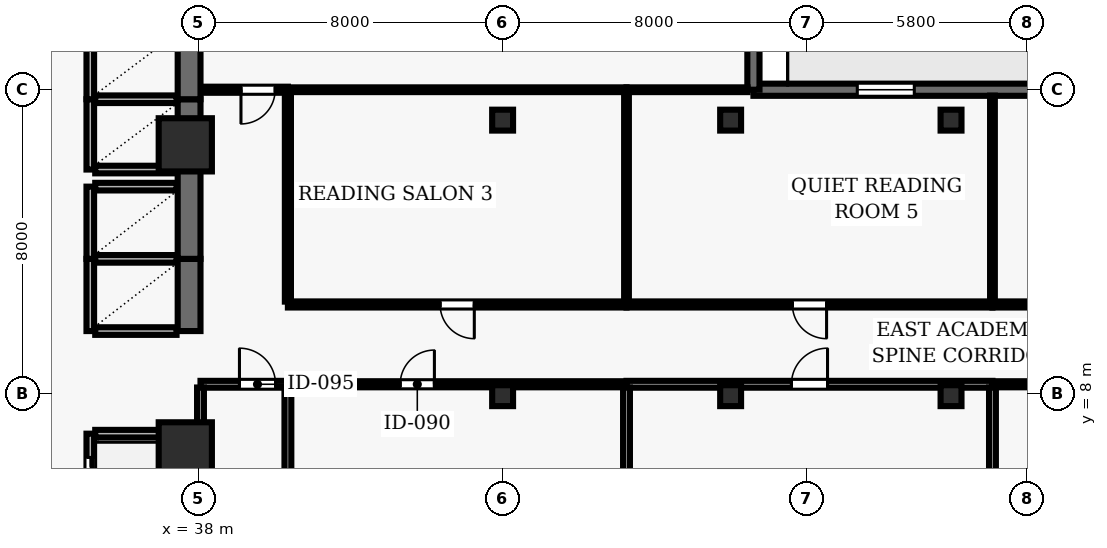
"""IFC4 building model, lengths in metres.
Left out: names, types, materials, properties, quantities, classifications, styles, units other than length and angle.
Written with IfcOpenShell. Run it as: python <this file> out.ifc"""

import sys

from ifc_helpers import new_model, si_unit, direction, frame, frame_2d, origin, origin_2d, place, context, subcontext, project, spatial, rectangle, hollow_rectangle, extrude, element, fill, save


model = new_model("IFC4")
c1 = context("Model", 3, precision=1e-05, world=origin(), true_north=direction((0.0, 1.0)))
c2 = subcontext(c1, "Body", "Model", "MODEL_VIEW")
j1 = project(units=[si_unit("LENGTHUNIT", "METRE"), si_unit("PLANEANGLEUNIT", "RADIAN")], contexts=[c1])
p1 = place(None, origin())
s1 = spatial("IfcSite", under=j1, at=p1, CompositionType="ELEMENT")
p2 = place(p1, origin())
s2 = spatial("IfcBuilding", under=s1, at=p2, CompositionType="ELEMENT")
p3 = place(p2, frame((0.0, 0.0, 58.3)))
s3 = spatial("IfcBuildingStorey", under=s2, at=p3, CompositionType="ELEMENT", Elevation=58.3)
for number, where, z_axis, x_axis in (
    (1, (37.65, 6.55, 0.0), (0.0, 0.0, 1.0), (1.0, 0.0, 0.0)),
    (2, (37.65, 14.55, 0.0), (0.0, 0.0, 1.0), (1.0, 0.0, 0.0)),
):
    element("IfcColumn", number, at=place(p3, frame(where, z_axis=z_axis, x_axis=x_axis)), inside=s3, PredefinedType="COLUMN", context=c2, shape_type="SweptSolid", body=[
        extrude(rectangle(XDim=1.4, YDim=1.4, at=origin_2d()), origin(), (0.0, 0.0, 1.0), 3.9),
    ])
for number, where, z_axis, x_axis in (
    (3, (46.0, 7.95, 0.0), (0.0, 0.0, 1.0), (1.0, 0.0, 0.0)),
    (4, (46.0, 15.2, 0.0), (0.0, 0.0, 1.0), (1.0, 0.0, 0.0)),
    (5, (52.0, 7.95, 0.0), (0.0, 0.0, 1.0), (1.0, 0.0, 0.0)),
    (6, (52.0, 15.2, 0.0), (0.0, 0.0, 1.0), (1.0, 0.0, 0.0)),
    (7, (57.8, 7.95, 0.0), (0.0, 0.0, 1.0), (1.0, 0.0, 0.0)),
    (8, (57.8, 15.2, 0.0), (0.0, 0.0, 1.0), (1.0, 0.0, 0.0)),
):
    element("IfcColumn", number, at=place(p3, frame(where, z_axis=z_axis, x_axis=x_axis)), inside=s3, PredefinedType="COLUMN", context=c2, shape_type="SweptSolid", body=[
        extrude(hollow_rectangle(XDim=0.55, YDim=0.55, WallThickness=0.025, at=origin_2d()), origin(), (0.0, 0.0, 1.0), 3.9),
    ])
p4 = place(p3, frame((73.5, 16.0, 0.0), z_axis=(0.0, 0.0, 1.0), x_axis=(-1.0, 0.0, 0.0)))
e9 = element("IfcWall", 9, at=p4, inside=s3, PredefinedType="SOLIDWALL", context=c2, shape_type="SweptSolid", body=[
    extrude(rectangle(XDim=20.9, YDim=0.32, at=frame_2d((10.45, 0.0))), origin(), (0.0, 0.0, 1.0), 3.69),
])
p5 = place(p4, frame((12.05, 0.0, 0.0)))
e10 = element("IfcOpeningElement", 10, at=p5, cuts=e9, PredefinedType="OPENING", context=c2, shape_type="SweptSolid", body=[
    extrude(rectangle(XDim=1.0, YDim=2.2, at=frame_2d((0.5, 1.1))), frame((0.0, 0.17, 0.0), z_axis=(0.0, -1.0, 0.0), x_axis=(1.0, 0.0, 0.0)), (0.0, 0.0, 1.0), 0.34),
])
p6 = place(p4, frame((2.733, 0.0, 0.9)))
e11 = element("IfcOpeningElement", 11, at=p6, cuts=e9, PredefinedType="OPENING", context=c2, shape_type="SweptSolid", body=[
    extrude(rectangle(XDim=1.5, YDim=1.8, at=frame_2d((0.75, 0.9))), frame((0.0, 0.17, 0.0), z_axis=(0.0, -1.0, 0.0), x_axis=(1.0, 0.0, 0.0)), (0.0, 0.0, 1.0), 0.34),
])
p7 = place(p4, frame((16.667, 0.0, 0.9)))
e12 = element("IfcOpeningElement", 12, at=p7, cuts=e9, PredefinedType="OPENING", context=c2, shape_type="SweptSolid", body=[
    extrude(rectangle(XDim=1.5, YDim=1.8, at=frame_2d((0.75, 0.9))), frame((0.0, 0.17, 0.0), z_axis=(0.0, -1.0, 0.0), x_axis=(1.0, 0.0, 0.0)), (0.0, 0.0, 1.0), 0.34),
])
p8 = place(p3, frame((52.6, 16.0, 0.0), z_axis=(0.0, 0.0, 1.0), x_axis=(0.0, 1.0, 0.0)))
e13 = element("IfcWall", 13, at=p8, inside=s3, PredefinedType="SOLIDWALL", context=c2, shape_type="SweptSolid", body=[
    extrude(rectangle(XDim=10.095, YDim=0.32, at=frame_2d((5.047, 0.0))), origin(), (0.0, 0.0, 1.0), 3.69),
])
p9 = place(p8, frame((4.147, 0.0, 0.9)))
e14 = element("IfcOpeningElement", 14, at=p9, cuts=e13, PredefinedType="OPENING", context=c2, shape_type="SweptSolid", body=[
    extrude(rectangle(XDim=1.8, YDim=1.8, at=frame_2d((0.9, 0.9))), frame((0.0, 0.17, 0.0), z_axis=(0.0, -1.0, 0.0), x_axis=(1.0, 0.0, 0.0)), (0.0, 0.0, 1.0), 0.34),
])
p10 = place(p3, frame((35.15, 6.95, 0.0), z_axis=(0.0, 0.0, 1.0), x_axis=(0.0, -1.0, 0.0)))
e15 = element("IfcWall", 15, at=p10, inside=s3, PredefinedType="SOLIDWALL", context=c2, shape_type="SweptSolid", body=[
    extrude(rectangle(XDim=2.25, YDim=0.2, at=frame_2d((1.125, 0.0))), origin(), (0.0, 0.0, 1.0), 3.69),
])
p11 = place(p10, frame((0.625, 0.0, 0.0)))
e16 = element("IfcOpeningElement", 16, at=p11, cuts=e15, PredefinedType="OPENING", context=c2, shape_type="SweptSolid", body=[
    extrude(rectangle(XDim=1.0, YDim=2.1, at=frame_2d((0.5, 1.05))), frame((0.0, 0.11, 0.0), z_axis=(0.0, -1.0, 0.0), x_axis=(1.0, 0.0, 0.0)), (0.0, 0.0, 1.0), 0.22),
])
p12 = place(p3, frame((37.75, 4.7, 0.0), z_axis=(0.0, 0.0, 1.0), x_axis=(0.0, 1.0, 0.0)))
e17 = element("IfcWall", 17, at=p12, inside=s3, PredefinedType="SHEAR", context=c2, shape_type="SweptSolid", body=[
    extrude(rectangle(XDim=2.25, YDim=0.6, at=frame_2d((1.125, 0.0))), origin(), (0.0, 0.0, 1.0), 3.69),
])
p13 = place(p3, frame((37.42, 6.95, 0.0), z_axis=(0.0, 0.0, 1.0), x_axis=(-1.0, 0.0, 0.0)))
e18 = element("IfcWall", 18, at=p13, inside=s3, PredefinedType="SOLIDWALL", context=c2, shape_type="SweptSolid", body=[
    extrude(rectangle(XDim=2.14, YDim=0.2, at=frame_2d((1.07, 0.0))), origin(), (0.0, 0.0, 1.0), 3.69),
])
p14 = place(p3, frame((35.15, 11.55, 0.0), z_axis=(0.0, 0.0, 1.0), x_axis=(0.0, -1.0, 0.0)))
e19 = element("IfcWall", 19, at=p14, inside=s3, PredefinedType="SOLIDWALL", context=c2, shape_type="SweptSolid", body=[
    extrude(rectangle(XDim=1.9, YDim=0.2, at=frame_2d((0.95, 0.0))), origin(), (0.0, 0.0, 1.0), 3.69),
])
p15 = place(p3, frame((37.75, 9.65, 0.0), z_axis=(0.0, 0.0, 1.0), x_axis=(0.0, 1.0, 0.0)))
e20 = element("IfcWall", 20, at=p15, inside=s3, PredefinedType="SHEAR", context=c2, shape_type="SweptSolid", body=[
    extrude(rectangle(XDim=1.9, YDim=0.6, at=frame_2d((0.95, 0.0))), origin(), (0.0, 0.0, 1.0), 3.69),
])
for number, where, z_axis, x_axis in (
    (21, (35.28, 9.65, 0.0), (0.0, 0.0, 1.0), (1.0, 0.0, 0.0)),
    (22, (37.42, 11.55, 0.0), (0.0, 0.0, 1.0), (-1.0, 0.0, 0.0)),
):
    element("IfcWall", number, at=place(p3, frame(where, z_axis=z_axis, x_axis=x_axis)), inside=s3, PredefinedType="SOLIDWALL", context=c2, shape_type="SweptSolid", body=[
        extrude(rectangle(XDim=2.14, YDim=0.2, at=frame_2d((1.07, 0.0))), origin(), (0.0, 0.0, 1.0), 3.69),
    ])
p16 = place(p3, frame((35.15, 13.45, 0.0), z_axis=(0.0, 0.0, 1.0), x_axis=(0.0, -1.0, 0.0)))
e23 = element("IfcWall", 23, at=p16, inside=s3, PredefinedType="SOLIDWALL", context=c2, shape_type="SweptSolid", body=[
    extrude(rectangle(XDim=1.9, YDim=0.2, at=frame_2d((0.95, 0.0))), origin(), (0.0, 0.0, 1.0), 3.69),
])
p17 = place(p3, frame((37.75, 11.55, 0.0), z_axis=(0.0, 0.0, 1.0), x_axis=(0.0, 1.0, 0.0)))
e24 = element("IfcWall", 24, at=p17, inside=s3, PredefinedType="SHEAR", context=c2, shape_type="SweptSolid", body=[
    extrude(rectangle(XDim=2.35, YDim=0.6, at=frame_2d((1.175, 0.0))), origin(), (0.0, 0.0, 1.0), 3.69),
])
p18 = place(p3, frame((37.42, 13.45, 0.0), z_axis=(0.0, 0.0, 1.0), x_axis=(-1.0, 0.0, 0.0)))
e25 = element("IfcWall", 25, at=p18, inside=s3, PredefinedType="SOLIDWALL", context=c2, shape_type="SweptSolid", body=[
    extrude(rectangle(XDim=2.14, YDim=0.2, at=frame_2d((1.07, 0.0))), origin(), (0.0, 0.0, 1.0), 3.69),
])
p19 = place(p3, frame((35.15, 15.75, 0.0), z_axis=(0.0, 0.0, 1.0), x_axis=(0.0, -1.0, 0.0)))
e26 = element("IfcWall", 26, at=p19, inside=s3, PredefinedType="SOLIDWALL", context=c2, shape_type="SweptSolid", body=[
    extrude(rectangle(XDim=1.85, YDim=0.2, at=frame_2d((0.925, 0.0))), origin(), (0.0, 0.0, 1.0), 3.69),
])
p20 = place(p3, frame((37.75, 13.9, 0.0), z_axis=(0.0, 0.0, 1.0), x_axis=(0.0, 1.0, 0.0)))
e27 = element("IfcWall", 27, at=p20, inside=s3, PredefinedType="SHEAR", context=c2, shape_type="SweptSolid", body=[
    extrude(rectangle(XDim=1.85, YDim=0.6, at=frame_2d((0.925, 0.0))), origin(), (0.0, 0.0, 1.0), 3.69),
])
for number, where, z_axis, x_axis in (
    (28, (35.28, 13.9, 0.0), (0.0, 0.0, 1.0), (1.0, 0.0, 0.0)),
    (29, (37.42, 15.75, 0.0), (0.0, 0.0, 1.0), (-1.0, 0.0, 0.0)),
):
    element("IfcWall", number, at=place(p3, frame(where, z_axis=z_axis, x_axis=x_axis)), inside=s3, PredefinedType="SOLIDWALL", context=c2, shape_type="SweptSolid", body=[
        extrude(rectangle(XDim=2.14, YDim=0.2, at=frame_2d((1.07, 0.0))), origin(), (0.0, 0.0, 1.0), 3.69),
    ])
p21 = place(p3, frame((35.15, 17.6, 0.0), z_axis=(0.0, 0.0, 1.0), x_axis=(0.0, -1.0, 0.0)))
e30 = element("IfcWall", 30, at=p21, inside=s3, PredefinedType="SOLIDWALL", context=c2, shape_type="SweptSolid", body=[
    extrude(rectangle(XDim=1.85, YDim=0.2, at=frame_2d((0.925, 0.0))), origin(), (0.0, 0.0, 1.0), 3.69),
])
p22 = place(p3, frame((37.75, 15.75, 0.0), z_axis=(0.0, 0.0, 1.0), x_axis=(0.0, 1.0, 0.0)))
e31 = element("IfcWall", 31, at=p22, inside=s3, PredefinedType="SHEAR", context=c2, shape_type="SweptSolid", body=[
    extrude(rectangle(XDim=1.85, YDim=0.6, at=frame_2d((0.925, 0.0))), origin(), (0.0, 0.0, 1.0), 3.69),
])
p23 = place(p3, frame((38.05, 8.25, 0.0), z_axis=(0.0, 0.0, 1.0), x_axis=(1.0, 0.0, 0.0)))
e32 = element("IfcWall", 32, at=p23, inside=s3, PredefinedType="PARTITIONING", context=c2, shape_type="SweptSolid", body=[
    extrude(rectangle(XDim=2.3, YDim=0.18, at=frame_2d((1.15, 0.0))), origin(), (0.0, 0.0, 1.0), 3.055),
])
p24 = place(p23, frame((1.025, 0.0, 0.0)))
e33 = element("IfcOpeningElement", 33, at=p24, cuts=e32, PredefinedType="OPENING", context=c2, shape_type="SweptSolid", body=[
    extrude(rectangle(XDim=0.95, YDim=2.1, at=frame_2d((0.475, 1.05))), frame((0.0, 0.1, 0.0), z_axis=(0.0, -1.0, 0.0), x_axis=(1.0, 0.0, 0.0)), (0.0, 0.0, 1.0), 0.2),
])
p25 = place(p3, frame((40.35, 8.25, 0.0), z_axis=(0.0, 0.0, 1.0), x_axis=(1.0, 0.0, 0.0)))
e34 = element("IfcWall", 34, at=p25, inside=s3, PredefinedType="PARTITIONING", context=c2, shape_type="SweptSolid", body=[
    extrude(rectangle(XDim=8.91, YDim=0.16, at=frame_2d((4.455, 0.0))), origin(), (0.0, 0.0, 1.0), 3.055),
])
p26 = place(p25, frame((2.955, 0.0, 0.0)))
e35 = element("IfcOpeningElement", 35, at=p26, cuts=e34, PredefinedType="OPENING", context=c2, shape_type="SweptSolid", body=[
    extrude(rectangle(XDim=0.9, YDim=2.1, at=frame_2d((0.45, 1.05))), frame((0.0, 0.09, 0.0), z_axis=(0.0, -1.0, 0.0), x_axis=(1.0, 0.0, 0.0)), (0.0, 0.0, 1.0), 0.18),
])
p27 = place(p3, frame((40.35, 16.0, 0.0), z_axis=(0.0, 0.0, 1.0), x_axis=(-1.0, 0.0, 0.0)))
e36 = element("IfcWall", 36, at=p27, inside=s3, PredefinedType="PARTITIONING", context=c2, shape_type="SweptSolid", body=[
    extrude(rectangle(XDim=2.27, YDim=0.16, at=frame_2d((1.135, 0.0))), origin(), (0.0, 0.0, 1.0), 3.69),
])
p28 = place(p27, frame((0.335, 0.0, 0.0)))
e37 = element("IfcOpeningElement", 37, at=p28, cuts=e36, PredefinedType="OPENING", context=c2, shape_type="SweptSolid", body=[
    extrude(rectangle(XDim=0.9, YDim=2.1, at=frame_2d((0.45, 1.05))), frame((0.0, 0.09, 0.0), z_axis=(0.0, -1.0, 0.0), x_axis=(1.0, 0.0, 0.0)), (0.0, 0.0, 1.0), 0.18),
])
p29 = place(p3, frame((49.26, 8.25, 0.0), z_axis=(0.0, 0.0, 1.0), x_axis=(1.0, 0.0, 0.0)))
e38 = element("IfcWall", 38, at=p29, inside=s3, PredefinedType="PARTITIONING", context=c2, shape_type="SweptSolid", body=[
    extrude(rectangle(XDim=9.63, YDim=0.18, at=frame_2d((4.815, 0.0))), origin(), (0.0, 0.0, 1.0), 3.055),
])
p30 = place(p29, frame((4.34, 0.0, 0.0)))
e39 = element("IfcOpeningElement", 39, at=p30, cuts=e38, PredefinedType="OPENING", context=c2, shape_type="SweptSolid", body=[
    extrude(rectangle(XDim=0.95, YDim=2.1, at=frame_2d((0.475, 1.05))), frame((0.0, 0.1, 0.0), z_axis=(0.0, -1.0, 0.0), x_axis=(1.0, 0.0, 0.0)), (0.0, 0.0, 1.0), 0.2),
])
p31 = place(p3, frame((49.26, 10.35, 0.0), z_axis=(0.0, 0.0, 1.0), x_axis=(-1.0, 0.0, 0.0)))
e40 = element("IfcWall", 40, at=p31, inside=s3, PredefinedType="PARTITIONING", context=c2, shape_type="SweptSolid", body=[
    extrude(rectangle(XDim=8.91, YDim=0.16, at=frame_2d((4.455, 0.0))), origin(), (0.0, 0.0, 1.0), 3.277),
])
p32 = place(p31, frame((4.005, 0.0, 0.0)))
e41 = element("IfcOpeningElement", 41, at=p32, cuts=e40, PredefinedType="OPENING", context=c2, shape_type="SweptSolid", body=[
    extrude(rectangle(XDim=0.9, YDim=2.1, at=frame_2d((0.45, 1.05))), frame((0.0, 0.09, 0.0), z_axis=(0.0, -1.0, 0.0), x_axis=(1.0, 0.0, 0.0)), (0.0, 0.0, 1.0), 0.18),
])
p33 = place(p3, frame((49.26, 16.0, 0.0), z_axis=(0.0, 0.0, 1.0), x_axis=(1.0, 0.0, 0.0)))
e42 = element("IfcWall", 42, at=p33, inside=s3, PredefinedType="PARTITIONING", context=c2, shape_type="SweptSolid", body=[
    extrude(rectangle(XDim=3.185, YDim=0.125, at=frame_2d((1.593, 0.0))), origin(), (0.0, 0.0, 1.0), 3.39),
])
p34 = place(p3, frame((49.26, 16.0, 0.0), z_axis=(0.0, 0.0, 1.0), x_axis=(-1.0, 0.0, 0.0)))
e43 = element("IfcWall", 43, at=p34, inside=s3, PredefinedType="PARTITIONING", context=c2, shape_type="SweptSolid", body=[
    extrude(rectangle(XDim=8.91, YDim=0.125, at=frame_2d((4.455, 0.0))), origin(), (0.0, 0.0, 1.0), 3.39),
])
p35 = place(p3, frame((58.89, 8.25, 0.0), z_axis=(0.0, 0.0, 1.0), x_axis=(1.0, 0.0, 0.0)))
e44 = element("IfcWall", 44, at=p35, inside=s3, PredefinedType="PARTITIONING", context=c2, shape_type="SweptSolid", body=[
    extrude(rectangle(XDim=9.71, YDim=0.16, at=frame_2d((4.855, 0.0))), origin(), (0.0, 0.0, 1.0), 3.69),
])
p36 = place(p35, frame((4.405, 0.0, 0.0)))
e45 = element("IfcOpeningElement", 45, at=p36, cuts=e44, PredefinedType="OPENING", context=c2, shape_type="SweptSolid", body=[
    extrude(rectangle(XDim=0.9, YDim=2.1, at=frame_2d((0.45, 1.05))), frame((0.0, 0.09, 0.0), z_axis=(0.0, -1.0, 0.0), x_axis=(1.0, 0.0, 0.0)), (0.0, 0.0, 1.0), 0.18),
])
p37 = place(p3, frame((58.89, 10.35, 0.0), z_axis=(0.0, 0.0, 1.0), x_axis=(-1.0, 0.0, 0.0)))
e46 = element("IfcWall", 46, at=p37, inside=s3, PredefinedType="PARTITIONING", context=c2, shape_type="SweptSolid", body=[
    extrude(rectangle(XDim=9.63, YDim=0.16, at=frame_2d((4.815, 0.0))), origin(), (0.0, 0.0, 1.0), 3.277),
])
p38 = place(p37, frame((4.365, 0.0, 0.0)))
e47 = element("IfcOpeningElement", 47, at=p38, cuts=e46, PredefinedType="OPENING", context=c2, shape_type="SweptSolid", body=[
    extrude(rectangle(XDim=0.9, YDim=2.1, at=frame_2d((0.45, 1.05))), frame((0.0, 0.09, 0.0), z_axis=(0.0, -1.0, 0.0), x_axis=(1.0, 0.0, 0.0)), (0.0, 0.0, 1.0), 0.18),
])
p39 = place(p3, frame((68.6, 10.35, 0.0), z_axis=(0.0, 0.0, 1.0), x_axis=(-1.0, 0.0, 0.0)))
e48 = element("IfcWall", 48, at=p39, inside=s3, PredefinedType="PARTITIONING", context=c2, shape_type="SweptSolid", body=[
    extrude(rectangle(XDim=9.71, YDim=0.16, at=frame_2d((4.855, 0.0))), origin(), (0.0, 0.0, 1.0), 3.277),
])
p40 = place(p39, frame((4.405, 0.0, 0.0)))
e49 = element("IfcOpeningElement", 49, at=p40, cuts=e48, PredefinedType="OPENING", context=c2, shape_type="SweptSolid", body=[
    extrude(rectangle(XDim=0.9, YDim=2.1, at=frame_2d((0.45, 1.05))), frame((0.0, 0.09, 0.0), z_axis=(0.0, -1.0, 0.0), x_axis=(1.0, 0.0, 0.0)), (0.0, 0.0, 1.0), 0.18),
])
p41 = place(p3, frame((38.05, 7.05, 0.0), z_axis=(0.0, 0.0, 1.0), x_axis=(0.0, 1.0, 0.0)))
e50 = element("IfcWall", 50, at=p41, inside=s3, PredefinedType="PARTITIONING", context=c2, shape_type="SweptSolid", body=[
    extrude(rectangle(XDim=1.115, YDim=0.18, at=frame_2d((0.558, 0.0))), origin(), (0.0, 0.0, 1.0), 3.055),
])
p42 = place(p3, frame((40.35, 0.155, 0.0), z_axis=(0.0, 0.0, 1.0), x_axis=(0.0, 1.0, 0.0)))
e51 = element("IfcWall", 51, at=p42, inside=s3, PredefinedType="PARTITIONING", context=c2, shape_type="SweptSolid", body=[
    extrude(rectangle(XDim=8.01, YDim=0.18, at=frame_2d((4.005, 0.0))), origin(), (0.0, 0.0, 1.0), 3.69),
])
p43 = place(p3, frame((40.35, 10.425, 0.0), z_axis=(0.0, 0.0, 1.0), x_axis=(0.0, 1.0, 0.0)))
e52 = element("IfcWall", 52, at=p43, inside=s3, PredefinedType="PARTITIONING", context=c2, shape_type="SweptSolid", body=[
    extrude(rectangle(XDim=5.5, YDim=0.16, at=frame_2d((2.75, 0.0))), origin(), (0.0, 0.0, 1.0), 3.277),
])
p44 = place(p3, frame((49.26, 0.155, 0.0), z_axis=(0.0, 0.0, 1.0), x_axis=(0.0, 1.0, 0.0)))
e53 = element("IfcWall", 53, at=p44, inside=s3, PredefinedType="PARTITIONING", context=c2, shape_type="SweptSolid", body=[
    extrude(rectangle(XDim=8.01, YDim=0.18, at=frame_2d((4.005, 0.0))), origin(), (0.0, 0.0, 1.0), 3.69),
])
p45 = place(p3, frame((49.26, 10.425, 0.0), z_axis=(0.0, 0.0, 1.0), x_axis=(0.0, 1.0, 0.0)))
e54 = element("IfcWall", 54, at=p45, inside=s3, PredefinedType="PARTITIONING", context=c2, shape_type="SweptSolid", body=[
    extrude(rectangle(XDim=5.518, YDim=0.125, at=frame_2d((2.759, 0.0))), origin(), (0.0, 0.0, 1.0), 3.69),
])
p46 = place(p3, frame((58.89, 0.155, 0.0), z_axis=(0.0, 0.0, 1.0), x_axis=(0.0, 1.0, 0.0)))
e55 = element("IfcWall", 55, at=p46, inside=s3, PredefinedType="PARTITIONING", context=c2, shape_type="SweptSolid", body=[
    extrude(rectangle(XDim=8.01, YDim=0.18, at=frame_2d((4.005, 0.0))), origin(), (0.0, 0.0, 1.0), 3.69),
])
p47 = place(p3, frame((58.89, 10.425, 0.0), z_axis=(0.0, 0.0, 1.0), x_axis=(0.0, 1.0, 0.0)))
e56 = element("IfcWall", 56, at=p47, inside=s3, PredefinedType="PARTITIONING", context=c2, shape_type="SweptSolid", body=[
    extrude(rectangle(XDim=5.42, YDim=0.125, at=frame_2d((2.71, 0.0))), origin(), (0.0, 0.0, 1.0), 3.69),
])
p48 = place(p7, origin())
e57 = element("IfcWindow", 57, at=p48, inside=s3, PartitioningType="SINGLE_PANEL", PredefinedType="WINDOW", context=c2, shape_type="SweptSolid", body=[
    extrude(rectangle(XDim=1.5, YDim=1.8, at=frame_2d((0.75, 0.9))), frame((0.0, 0.03, 0.0), z_axis=(0.0, -1.0, 0.0), x_axis=(1.0, 0.0, 0.0)), (0.0, 0.0, 1.0), 0.06),
])
fill(e12, e57)
p49 = place(p11, origin())
e58 = element("IfcDoor", 58, at=p49, inside=s3, OperationType="DOUBLE_DOOR_SLIDING", PredefinedType="DOOR", context=c2, shape_type="SweptSolid", body=[
    extrude(rectangle(XDim=1.0, YDim=2.1, at=frame_2d((0.5, 1.05))), frame((0.0, 0.025, 0.0), z_axis=(0.0, -1.0, 0.0), x_axis=(1.0, 0.0, 0.0)), (0.0, 0.0, 1.0), 0.05),
])
fill(e16, e58)
p50 = place(p24, origin())
e59 = element("IfcDoor", 59, at=p50, inside=s3, OperationType="SINGLE_SWING_LEFT", PredefinedType="DOOR", context=c2, shape_type="SweptSolid", body=[
    extrude(rectangle(XDim=0.95, YDim=2.1, at=frame_2d((0.475, 1.05))), frame((0.0, 0.025, 0.0), z_axis=(0.0, -1.0, 0.0), x_axis=(1.0, 0.0, 0.0)), (0.0, 0.0, 1.0), 0.05),
])
fill(e33, e59)
p51 = place(p26, origin())
e60 = element("IfcDoor", 60, at=p51, inside=s3, OperationType="SINGLE_SWING_RIGHT", PredefinedType="DOOR", context=c2, shape_type="SweptSolid", body=[
    extrude(rectangle(XDim=0.9, YDim=2.1, at=frame_2d((0.45, 1.05))), frame((0.0, 0.025, 0.0), z_axis=(0.0, -1.0, 0.0), x_axis=(1.0, 0.0, 0.0)), (0.0, 0.0, 1.0), 0.05),
])
fill(e35, e60)
p52 = place(p32, origin())
e61 = element("IfcDoor", 61, at=p52, inside=s3, OperationType="SINGLE_SWING_LEFT", PredefinedType="DOOR", context=c2, shape_type="SweptSolid", body=[
    extrude(rectangle(XDim=0.9, YDim=2.1, at=frame_2d((0.45, 1.05))), frame((0.0, 0.025, 0.0), z_axis=(0.0, -1.0, 0.0), x_axis=(1.0, 0.0, 0.0)), (0.0, 0.0, 1.0), 0.05),
])
fill(e41, e61)
p53 = place(p30, origin())
e62 = element("IfcDoor", 62, at=p53, inside=s3, OperationType="SINGLE_SWING_RIGHT", PredefinedType="DOOR", context=c2, shape_type="SweptSolid", body=[
    extrude(rectangle(XDim=0.95, YDim=2.1, at=frame_2d((0.475, 1.05))), frame((0.0, 0.025, 0.0), z_axis=(0.0, -1.0, 0.0), x_axis=(1.0, 0.0, 0.0)), (0.0, 0.0, 1.0), 0.05),
])
fill(e39, e62)
p54 = place(p38, origin())
e63 = element("IfcDoor", 63, at=p54, inside=s3, OperationType="SINGLE_SWING_LEFT", PredefinedType="DOOR", context=c2, shape_type="SweptSolid", body=[
    extrude(rectangle(XDim=0.9, YDim=2.1, at=frame_2d((0.45, 1.05))), frame((0.0, 0.025, 0.0), z_axis=(0.0, -1.0, 0.0), x_axis=(1.0, 0.0, 0.0)), (0.0, 0.0, 1.0), 0.05),
])
fill(e47, e63)
p55 = place(p28, origin())
e64 = element("IfcDoor", 64, at=p55, inside=s3, OperationType="SINGLE_SWING_RIGHT", PredefinedType="DOOR", context=c2, shape_type="SweptSolid", body=[
    extrude(rectangle(XDim=0.9, YDim=2.1, at=frame_2d((0.45, 1.05))), frame((0.0, 0.025, 0.0), z_axis=(0.0, -1.0, 0.0), x_axis=(1.0, 0.0, 0.0)), (0.0, 0.0, 1.0), 0.05),
])
fill(e37, e64)
save(model, sys.argv[1])
